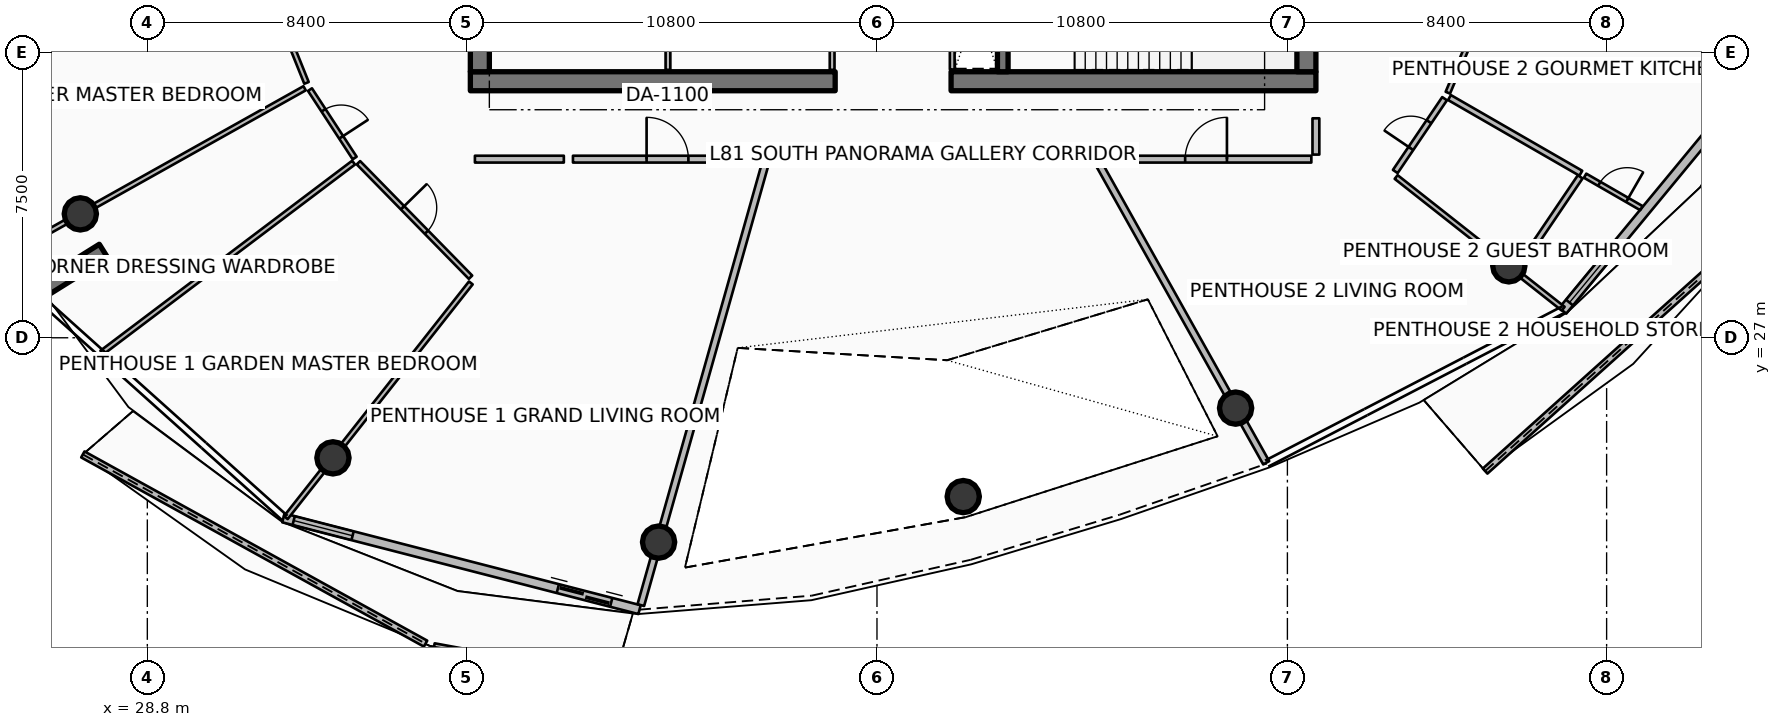
"""IFC4 building model, lengths in metres.
Left out: names, types, materials, properties, quantities, classifications, styles, units other than length and angle.
Written with IfcOpenShell. Run it as: python <this file> out.ifc"""

import sys

from ifc_helpers import new_model, si_unit, direction, frame, frame_2d, origin, origin_2d, place, context, subcontext, project, spatial, polyline, rectangle, circle, outline, extrude, element, fill, save


model = new_model("IFC4")
c1 = context("Model", 3, precision=1e-05, world=origin(), true_north=direction((0.0, 1.0)))
c2 = subcontext(c1, "Body", "Model", "MODEL_VIEW")
j1 = project(units=[si_unit("LENGTHUNIT", "METRE"), si_unit("PLANEANGLEUNIT", "RADIAN")], contexts=[c1])
p1 = place(None, origin())
s1 = spatial("IfcSite", under=j1, at=p1, CompositionType="ELEMENT")
p2 = place(p1, origin())
s2 = spatial("IfcBuilding", under=s1, at=p2, CompositionType="ELEMENT")
p3 = place(p2, frame((0.0, 0.0, 322.1)))
s3 = spatial("IfcBuildingStorey", under=s2, at=p3, CompositionType="ELEMENT", Elevation=322.1)
p4 = place(p3, frame((37.3, 33.75, 0.0), z_axis=(0.0, 0.0, 1.0), x_axis=(1.0, 0.0, 0.0)))
e1 = element("IfcWall", 1, at=p4, inside=s3, PredefinedType="SHEAR", context=c2, shape_type="SweptSolid", body=[
    extrude(rectangle(XDim=9.6, YDim=0.5, at=frame_2d((4.8, 0.0))), origin(), (0.0, 0.0, 1.0), 4.2),
])
p5 = place(p3, frame((49.95, 33.75, 0.0), z_axis=(0.0, 0.0, 1.0), x_axis=(1.0, 0.0, 0.0)))
e2 = element("IfcWall", 2, at=p5, inside=s3, PredefinedType="SHEAR", context=c2, shape_type="SweptSolid", body=[
    extrude(rectangle(XDim=9.6, YDim=0.5, at=frame_2d((4.8, 0.0))), origin(), (0.0, 0.0, 1.0), 4.2),
])
for number, where, z_axis, x_axis in (
    (3, (37.55, 34.0, 0.0), (0.0, 0.0, 1.0), (0.0, 1.0, 0.0)),
    (4, (59.3, 34.0, 0.0), (0.0, 0.0, 1.0), (0.0, 1.0, 0.0)),
):
    element("IfcWall", number, at=place(p3, frame(where, z_axis=z_axis, x_axis=x_axis)), inside=s3, PredefinedType="SHEAR", context=c2, shape_type="SweptSolid", body=[
        extrude(rectangle(XDim=16.0, YDim=0.5, at=frame_2d((8.0, 0.0))), origin(), (0.0, 0.0, 1.0), 4.2),
    ])
p6 = place(p3, frame((51.31, 34.0, 0.0), z_axis=(0.0, 0.0, 1.0), x_axis=(0.0, 1.0, 0.0)))
e5 = element("IfcWall", 5, at=p6, inside=s3, PredefinedType="SHEAR", context=c2, shape_type="SweptSolid", body=[
    extrude(rectangle(XDim=3.5, YDim=0.28, at=frame_2d((1.75, 0.0))), origin(), (0.0, 0.0, 1.0), 4.2),
])
p7 = place(p3, frame((27.647, 29.282, 0.0), z_axis=(0.0, 0.0, 1.0), x_axis=(-0.848053161125, -0.529911158502, 0.0)))
e6 = element("IfcWall", 6, at=p7, inside=s3, PredefinedType="SOLIDWALL", context=c2, shape_type="SweptSolid", body=[
    extrude(rectangle(XDim=3.5, YDim=0.42, at=frame_2d((1.75, 0.0))), origin(), (0.0, 0.0, 1.0), 4.2),
])
for number, where, z_axis, x_axis in (
    (7, (27.037, 30.26, 0.0), (0.0, 0.0, 1.0), (1.0, 0.0, 0.0)),
    (8, (33.684, 23.841, 0.0), (0.0, 0.0, 1.0), (1.0, 0.0, 0.0)),
    (9, (42.253, 21.624, 0.0), (0.0, 0.0, 1.0), (1.0, 0.0, 0.0)),
):
    element("IfcColumn", number, at=place(p3, frame(where, z_axis=z_axis, x_axis=x_axis)), inside=s3, PredefinedType="COLUMN", context=c2, shape_type="SweptSolid", body=[
        extrude(circle(Radius=0.425, at=origin_2d()), origin(), (0.0, 0.0, 1.0), 3.94),
    ])
p8 = place(p3, frame((50.27, 22.821, 0.0), z_axis=(0.0, 0.0, 1.0), x_axis=(1.0, 0.0, 0.0)))
e10 = element("IfcColumn", 10, at=p8, inside=s3, PredefinedType="COLUMN", context=c2, shape_type="SweptSolid", body=[
    extrude(circle(Radius=0.425, at=origin_2d()), origin(), (0.0, 0.0, 1.0), 4.196),
])
for number, where, z_axis, x_axis in (
    (11, (57.437, 25.149, 0.0), (0.0, 0.0, 1.0), (1.0, 0.0, 0.0)),
    (12, (64.626, 28.893, 0.0), (0.0, 0.0, 1.0), (1.0, 0.0, 0.0)),
):
    element("IfcColumn", number, at=place(p3, frame(where, z_axis=z_axis, x_axis=x_axis)), inside=s3, PredefinedType="COLUMN", context=c2, shape_type="SweptSolid", body=[
        extrude(circle(Radius=0.425, at=origin_2d()), origin(), (0.0, 0.0, 1.0), 3.94),
    ])
p9 = place(p3, frame((27.103, 23.93, 0.0), z_axis=(0.0, 0.0, 1.0), x_axis=(0.875469817093, -0.483272800145, 0.0)))
e13 = element("IfcWall", 13, at=p9, inside=s3, PredefinedType="PARAPET", context=c2, shape_type="SweptSolid", body=[
    extrude(outline(polyline([(0.0, 0.0), (10.302, 0.0), (10.302, 1.148), (5.151, 1.127), (0.0, 1.224), (0.0, 0.0)])), frame((0.0, 0.09, 0.0), z_axis=(0.0, -1.0, 0.0), x_axis=(1.0, 0.0, 0.0)), (0.0, 0.0, 1.0), 0.18),
])
p10 = place(p3, frame((36.345, 18.872, 0.0), z_axis=(0.0, 0.0, 1.0), x_axis=(0.983429847583, -0.18128909201, 0.0)))
e14 = element("IfcWall", 14, at=p10, inside=s3, PredefinedType="PARAPET", context=c2, shape_type="SweptSolid", body=[
    extrude(outline(polyline([(0.0, 0.0), (4.808, 0.0), (4.808, 1.279), (0.0, 1.148), (0.0, 0.0)])), frame((0.0, 0.09, 0.0), z_axis=(0.0, -1.0, 0.0), x_axis=(1.0, 0.0, 0.0)), (0.0, 0.0, 1.0), 0.18),
])
p11 = place(p3, frame((64.003, 23.493, 0.0), z_axis=(0.0, 0.0, 1.0), x_axis=(0.74390919155, 0.668280715514, 0.0)))
e15 = element("IfcWall", 15, at=p11, inside=s3, PredefinedType="PARAPET", context=c2, shape_type="SweptSolid", body=[
    extrude(outline(polyline([(0.0, 0.0), (9.765, 0.0), (9.765, 1.348), (4.883, 1.562), (0.0, 1.747), (0.0, 0.0)])), frame((0.0, 0.09, 0.0), z_axis=(0.0, -1.0, 0.0), x_axis=(1.0, 0.0, 0.0)), (0.0, 0.0, 1.0), 0.18),
])
p12 = place(p3, frame((32.38, 22.26, 0.0), z_axis=(0.0, 0.0, 1.0), x_axis=(0.968389062354, -0.249444630957, 0.0)))
e16 = element("IfcWall", 16, at=p12, inside=s3, PredefinedType="SOLIDWALL", context=c2, shape_type="SweptSolid", body=[
    extrude(rectangle(XDim=9.678, YDim=0.24, at=frame_2d((4.839, 0.0))), origin(), (0.0, 0.0, 1.0), 2.89),
])
p13 = place(p12, frame((7.458, 0.0, 0.0)))
e17 = element("IfcOpeningElement", 17, at=p13, cuts=e16, PredefinedType="OPENING", context=c2, shape_type="SweptSolid", body=[
    extrude(rectangle(XDim=1.45, YDim=2.15, at=frame_2d((0.725, 1.075))), frame((0.0, 0.13, 0.0), z_axis=(0.0, -1.0, 0.0), x_axis=(1.0, 0.0, 0.0)), (0.0, 0.0, 1.0), 0.26),
])
p14 = place(p12, frame((0.28, 0.0, 0.65)))
e18 = element("IfcOpeningElement", 18, at=p14, cuts=e16, PredefinedType="OPENING", context=c2, shape_type="SweptSolid", body=[
    extrude(rectangle(XDim=1.6, YDim=1.5, at=frame_2d((0.8, 0.75))), frame((0.0, 0.13, 0.0), z_axis=(0.0, -1.0, 0.0), x_axis=(1.0, 0.0, 0.0)), (0.0, 0.0, 1.0), 0.26),
])
p15 = place(p3, frame((66.045, 27.711, 0.0), z_axis=(0.0, 0.0, 1.0), x_axis=(0.636803612721, 0.771026042897, 0.0)))
e19 = element("IfcWall", 19, at=p15, inside=s3, PredefinedType="SOLIDWALL", context=c2, shape_type="SweptSolid", body=[
    extrude(rectangle(XDim=9.728, YDim=0.24, at=frame_2d((4.864, 0.0))), origin(), (0.0, 0.0, 1.0), 2.89),
])
p16 = place(p15, frame((7.508, 0.0, 0.0)))
e20 = element("IfcOpeningElement", 20, at=p16, cuts=e19, PredefinedType="OPENING", context=c2, shape_type="SweptSolid", body=[
    extrude(rectangle(XDim=1.45, YDim=2.15, at=frame_2d((0.725, 1.075))), frame((0.0, 0.13, 0.0), z_axis=(0.0, -1.0, 0.0), x_axis=(1.0, 0.0, 0.0)), (0.0, 0.0, 1.0), 0.26),
])
p17 = place(p15, frame((0.28, 0.0, 0.65)))
e21 = element("IfcOpeningElement", 21, at=p17, cuts=e19, PredefinedType="OPENING", context=c2, shape_type="SweptSolid", body=[
    extrude(rectangle(XDim=1.6, YDim=1.5, at=frame_2d((0.8, 0.75))), frame((0.0, 0.13, 0.0), z_axis=(0.0, -1.0, 0.0), x_axis=(1.0, 0.0, 0.0)), (0.0, 0.0, 1.0), 0.26),
])
for number, where, z_axis, x_axis in (
    (22, (46.82, 34.05, 0.0), (0.0, 0.0, 1.0), (0.0, 1.0, 0.0)),
    (23, (42.5, 34.05, 0.0), (0.0, 0.0, 1.0), (0.0, 1.0, 0.0)),
):
    element("IfcWall", number, at=place(p3, frame(where, z_axis=z_axis, x_axis=x_axis)), inside=s3, PredefinedType="PARTITIONING", context=c2, shape_type="SweptSolid", body=[
        extrude(rectangle(XDim=2.03, YDim=0.125, at=frame_2d((1.015, 0.0))), origin(), (0.0, 0.0, 1.0), 3.38),
    ])
p18 = place(p3, frame((49.98, 34.06, 0.0), z_axis=(0.0, 0.0, 1.0), x_axis=(0.0, 1.0, 0.0)))
e24 = element("IfcWall", 24, at=p18, inside=s3, PredefinedType="PARTITIONING", context=c2, shape_type="SweptSolid", body=[
    extrude(rectangle(XDim=3.4, YDim=0.125, at=frame_2d((1.7, 0.0))), origin(), (0.0, 0.0, 1.0), 3.38),
])
p19 = place(p3, frame((45.165, 31.7, 0.0), z_axis=(0.0, 0.0, 1.0), x_axis=(1.0, 0.0, 0.0)))
e25 = element("IfcWall", 25, at=p19, inside=s3, PredefinedType="SOLIDWALL", context=c2, shape_type="SweptSolid", body=[
    extrude(rectangle(XDim=8.533, YDim=0.24, at=frame_2d((4.267, 0.0))), origin(), (0.0, 0.0, 1.0), 3.38),
])
p20 = place(p3, frame((45.095, 31.7, 0.0), z_axis=(0.0, 0.0, 1.0), x_axis=(-0.271453030279, -0.962451688321, 0.0)))
e26 = element("IfcWall", 26, at=p20, inside=s3, PredefinedType="PARTITIONING", context=c2, shape_type="SweptSolid", body=[
    extrude(rectangle(XDim=12.191, YDim=0.18, at=frame_2d((6.096, 0.0))), origin(), (0.0, 0.0, 1.0), 3.38),
])
p21 = place(p3, frame((53.768, 31.7, 0.0), z_axis=(0.0, 0.0, 1.0), x_axis=(0.488623665245, -0.872494649704, 0.0)))
e27 = element("IfcWall", 27, at=p21, inside=s3, PredefinedType="PARTITIONING", context=c2, shape_type="SweptSolid", body=[
    extrude(rectangle(XDim=9.157, YDim=0.18, at=frame_2d((4.579, 0.0))), origin(), (0.0, 0.0, 1.0), 3.38),
])
p22 = place(p3, frame((40.0, 31.7, 0.0), z_axis=(0.0, 0.0, 1.0), x_axis=(1.0, 0.0, 0.0)))
e28 = element("IfcWall", 28, at=p22, inside=s3, PredefinedType="PARTITIONING", context=c2, shape_type="SweptSolid", body=[
    extrude(rectangle(XDim=4.975, YDim=0.18, at=frame_2d((2.488, 0.0))), origin(), (0.0, 0.0, 1.0), 3.38),
])
p23 = place(p22, frame((1.938, 0.0, 0.0)))
e29 = element("IfcOpeningElement", 29, at=p23, cuts=e28, PredefinedType="OPENING", context=c2, shape_type="SweptSolid", body=[
    extrude(rectangle(XDim=1.1, YDim=2.1, at=frame_2d((0.55, 1.05))), frame((0.0, 0.1, 0.0), z_axis=(0.0, -1.0, 0.0), x_axis=(1.0, 0.0, 0.0)), (0.0, 0.0, 1.0), 0.2),
])
p24 = place(p3, frame((31.416, 37.618, 0.0), z_axis=(0.0, 0.0, 1.0), x_axis=(0.37287786912, -0.927880431263, 0.0)))
e30 = element("IfcWall", 30, at=p24, inside=s3, PredefinedType="PARTITIONING", context=c2, shape_type="SweptSolid", body=[
    extrude(rectangle(XDim=4.216, YDim=0.125, at=frame_2d((2.108, 0.0))), origin(), (0.0, 0.0, 1.0), 3.38),
])
p25 = place(p24, frame((1.658, 0.0, 0.0)))
e31 = element("IfcOpeningElement", 31, at=p25, cuts=e30, PredefinedType="OPENING", context=c2, shape_type="SweptSolid", body=[
    extrude(rectangle(XDim=0.9, YDim=2.08, at=frame_2d((0.45, 1.04))), frame((0.0, 0.073, 0.0), z_axis=(0.0, -1.0, 0.0), x_axis=(1.0, 0.0, 0.0)), (0.0, 0.0, 1.0), 0.145),
])
p26 = place(p3, frame((37.42, 31.7, 0.0), z_axis=(0.0, 0.0, 1.0), x_axis=(1.0, 0.0, 0.0)))
e32 = element("IfcWall", 32, at=p26, inside=s3, PredefinedType="PARTITIONING", context=c2, shape_type="SweptSolid", body=[
    extrude(rectangle(XDim=2.34, YDim=0.18, at=frame_2d((1.17, 0.0))), origin(), (0.0, 0.0, 1.0), 3.38),
])
p27 = place(p3, frame((32.938, 33.565, 0.0), z_axis=(0.0, 0.0, 1.0), x_axis=(-0.87250261652, -0.488609439293, 0.0)))
e33 = element("IfcWall", 33, at=p27, inside=s3, PredefinedType="PARTITIONING", context=c2, shape_type="SweptSolid", body=[
    extrude(rectangle(XDim=8.573, YDim=0.125, at=frame_2d((4.286, 0.0))), origin(), (0.0, 0.0, 1.0), 3.38),
])
p28 = place(p3, frame((37.312, 28.443, 0.0), z_axis=(0.0, 0.0, 1.0), x_axis=(-0.619079427556, -0.78532837869, 0.0)))
e34 = element("IfcWall", 34, at=p28, inside=s3, PredefinedType="PARTITIONING", context=c2, shape_type="SweptSolid", body=[
    extrude(rectangle(XDim=7.864, YDim=0.125, at=frame_2d((3.932, 0.0))), origin(), (0.0, 0.0, 1.0), 3.38),
])
p29 = place(p3, frame((34.228, 31.608, 0.0), z_axis=(0.0, 0.0, 1.0), x_axis=(-0.798277484709, -0.602289845014, 0.0)))
e35 = element("IfcWall", 35, at=p29, inside=s3, PredefinedType="PARTITIONING", context=c2, shape_type="SweptSolid", body=[
    extrude(rectangle(XDim=8.299, YDim=0.125, at=frame_2d((4.149, 0.0))), origin(), (0.0, 0.0, 1.0), 3.38),
])
p30 = place(p3, frame((33.08, 33.53, 0.0), z_axis=(0.0, 0.0, 1.0), x_axis=(0.546735291737, -0.837305512205, 0.0)))
e36 = element("IfcWall", 36, at=p30, inside=s3, PredefinedType="PARTITIONING", context=c2, shape_type="SweptSolid", body=[
    extrude(rectangle(XDim=2.15, YDim=0.125, at=frame_2d((1.075, 0.0))), origin(), (0.0, 0.0, 1.0), 3.38),
])
p31 = place(p30, frame((0.65, 0.0, 0.0)))
e37 = element("IfcOpeningElement", 37, at=p31, cuts=e36, PredefinedType="OPENING", context=c2, shape_type="SweptSolid", body=[
    extrude(rectangle(XDim=0.85, YDim=2.06, at=frame_2d((0.425, 1.03))), frame((0.0, 0.073, 0.0), z_axis=(0.0, -1.0, 0.0), x_axis=(1.0, 0.0, 0.0)), (0.0, 0.0, 1.0), 0.145),
])
p32 = place(p3, frame((34.355, 31.605, 0.0), z_axis=(0.0, 0.0, 1.0), x_axis=(0.699567507915, -0.714566513258, 0.0)))
e38 = element("IfcWall", 38, at=p32, inside=s3, PredefinedType="PARTITIONING", context=c2, shape_type="SweptSolid", body=[
    extrude(rectangle(XDim=4.216, YDim=0.125, at=frame_2d((2.108, 0.0))), origin(), (0.0, 0.0, 1.0), 3.38),
])
p33 = place(p32, frame((1.658, 0.0, 0.0)))
e39 = element("IfcOpeningElement", 39, at=p33, cuts=e38, PredefinedType="OPENING", context=c2, shape_type="SweptSolid", body=[
    extrude(rectangle(XDim=0.9, YDim=2.08, at=frame_2d((0.45, 1.04))), frame((0.0, 0.073, 0.0), z_axis=(0.0, -1.0, 0.0), x_axis=(1.0, 0.0, 0.0)), (0.0, 0.0, 1.0), 0.145),
])
p34 = place(p3, frame((53.888, 31.7, 0.0), z_axis=(0.0, 0.0, 1.0), x_axis=(1.0, 0.0, 0.0)))
e40 = element("IfcWall", 40, at=p34, inside=s3, PredefinedType="PARTITIONING", context=c2, shape_type="SweptSolid", body=[
    extrude(rectangle(XDim=5.542, YDim=0.18, at=frame_2d((2.771, 0.0))), origin(), (0.0, 0.0, 1.0), 3.38),
])
p35 = place(p34, frame((2.221, 0.0, 0.0)))
e41 = element("IfcOpeningElement", 41, at=p35, cuts=e40, PredefinedType="OPENING", context=c2, shape_type="SweptSolid", body=[
    extrude(rectangle(XDim=1.1, YDim=2.1, at=frame_2d((0.55, 1.05))), frame((0.0, 0.1, 0.0), z_axis=(0.0, -1.0, 0.0), x_axis=(1.0, 0.0, 0.0)), (0.0, 0.0, 1.0), 0.2),
])
p36 = place(p3, frame((59.55, 31.82, 0.0), z_axis=(0.0, 0.0, 1.0), x_axis=(0.0, 1.0, 0.0)))
e42 = element("IfcWall", 42, at=p36, inside=s3, PredefinedType="PARTITIONING", context=c2, shape_type="SweptSolid", body=[
    extrude(rectangle(XDim=0.955, YDim=0.18, at=frame_2d((0.477, 0.0))), origin(), (0.0, 0.0, 1.0), 3.38),
])
p37 = place(p3, frame((61.661, 31.23, 0.0), z_axis=(0.0, 0.0, 1.0), x_axis=(0.785321366699, -0.61908832246, 0.0)))
e43 = element("IfcWall", 43, at=p37, inside=s3, PredefinedType="PARTITIONING", context=c2, shape_type="SweptSolid", body=[
    extrude(rectangle(XDim=5.597, YDim=0.125, at=frame_2d((2.799, 0.0))), origin(), (0.0, 0.0, 1.0), 3.38),
])
p38 = place(p3, frame((61.639, 31.375, 0.0), z_axis=(0.0, 0.0, 1.0), x_axis=(0.56062651507, 0.828068783738, 0.0)))
e44 = element("IfcWall", 44, at=p38, inside=s3, PredefinedType="PARTITIONING", context=c2, shape_type="SweptSolid", body=[
    extrude(rectangle(XDim=2.314, YDim=0.15, at=frame_2d((1.157, 0.0))), origin(), (0.0, 0.0, 1.0), 3.38),
])
p39 = place(p38, frame((0.732, 0.0, 0.0)))
e45 = element("IfcOpeningElement", 45, at=p39, cuts=e44, PredefinedType="OPENING", context=c2, shape_type="SweptSolid", body=[
    extrude(rectangle(XDim=0.85, YDim=2.06, at=frame_2d((0.425, 1.03))), frame((0.0, 0.085, 0.0), z_axis=(0.0, -1.0, 0.0), x_axis=(1.0, 0.0, 0.0)), (0.0, 0.0, 1.0), 0.17),
])
p40 = place(p3, frame((64.874, 28.825, 0.0), z_axis=(0.0, 0.0, 1.0), x_axis=(0.560532780406, 0.82813223708, 0.0)))
e46 = element("IfcWall", 46, at=p40, inside=s3, PredefinedType="PARTITIONING", context=c2, shape_type="SweptSolid", body=[
    extrude(rectangle(XDim=2.91, YDim=0.15, at=frame_2d((1.455, 0.0))), origin(), (0.0, 0.0, 1.0), 3.38),
])
p41 = place(p3, frame((63.065, 33.321, 0.0), z_axis=(0.0, 0.0, 1.0), x_axis=(0.866490095299, -0.499194265541, 0.0)))
e47 = element("IfcWall", 47, at=p41, inside=s3, PredefinedType="PARTITIONING", context=c2, shape_type="SweptSolid", body=[
    extrude(rectangle(XDim=3.989, YDim=0.15, at=frame_2d((1.994, 0.0))), origin(), (0.0, 0.0, 1.0), 3.38),
])
p42 = place(p3, frame((66.634, 31.265, 0.0), z_axis=(0.0, 0.0, 1.0), x_axis=(0.866444624685, -0.499273184094, 0.0)))
e48 = element("IfcWall", 48, at=p42, inside=s3, PredefinedType="PARTITIONING", context=c2, shape_type="SweptSolid", body=[
    extrude(rectangle(XDim=1.709, YDim=0.125, at=frame_2d((0.855, 0.0))), origin(), (0.0, 0.0, 1.0), 3.38),
])
p43 = place(p42, frame((0.43, 0.0, 0.0)))
e49 = element("IfcOpeningElement", 49, at=p43, cuts=e48, PredefinedType="OPENING", context=c2, shape_type="SweptSolid", body=[
    extrude(rectangle(XDim=0.85, YDim=2.06, at=frame_2d((0.425, 1.03))), frame((0.0, 0.073, 0.0), z_axis=(0.0, -1.0, 0.0), x_axis=(1.0, 0.0, 0.0)), (0.0, 0.0, 1.0), 0.145),
])
p44 = place(p3, frame((63.021, 33.448, 0.0), z_axis=(0.0, 0.0, 1.0), x_axis=(0.388350881923, 0.921511580236, 0.0)))
e50 = element("IfcWall", 50, at=p44, inside=s3, PredefinedType="PARTITIONING", context=c2, shape_type="SweptSolid", body=[
    extrude(rectangle(XDim=4.085, YDim=0.125, at=frame_2d((2.042, 0.0))), origin(), (0.0, 0.0, 1.0), 3.38),
])
p45 = place(p44, frame((1.593, 0.0, 0.0)))
e51 = element("IfcOpeningElement", 51, at=p45, cuts=e50, PredefinedType="OPENING", context=c2, shape_type="SweptSolid", body=[
    extrude(rectangle(XDim=0.9, YDim=2.08, at=frame_2d((0.45, 1.04))), frame((0.0, 0.073, 0.0), z_axis=(0.0, -1.0, 0.0), x_axis=(1.0, 0.0, 0.0)), (0.0, 0.0, 1.0), 0.145),
])
p46 = place(p13, origin())
e52 = element("IfcDoor", 52, at=p46, inside=s3, OperationType="DOUBLE_DOOR_SLIDING", PredefinedType="DOOR", context=c2, shape_type="SweptSolid", body=[
    extrude(rectangle(XDim=1.45, YDim=2.15, at=frame_2d((0.725, 1.075))), frame((0.0, 0.025, 0.0), z_axis=(0.0, -1.0, 0.0), x_axis=(1.0, 0.0, 0.0)), (0.0, 0.0, 1.0), 0.05),
])
fill(e17, e52)
p47 = place(p14, origin())
e53 = element("IfcWindow", 53, at=p47, inside=s3, PartitioningType="SINGLE_PANEL", PredefinedType="WINDOW", context=c2, shape_type="SweptSolid", body=[
    extrude(rectangle(XDim=1.6, YDim=1.5, at=frame_2d((0.8, 0.75))), frame((0.0, 0.03, 0.0), z_axis=(0.0, -1.0, 0.0), x_axis=(1.0, 0.0, 0.0)), (0.0, 0.0, 1.0), 0.06),
])
fill(e18, e53)
p48 = place(p17, origin())
e54 = element("IfcWindow", 54, at=p48, inside=s3, PartitioningType="SINGLE_PANEL", PredefinedType="WINDOW", context=c2, shape_type="SweptSolid", body=[
    extrude(rectangle(XDim=1.6, YDim=1.5, at=frame_2d((0.8, 0.75))), frame((0.0, 0.03, 0.0), z_axis=(0.0, -1.0, 0.0), x_axis=(1.0, 0.0, 0.0)), (0.0, 0.0, 1.0), 0.06),
])
fill(e21, e54)
p49 = place(p23, origin())
e55 = element("IfcDoor", 55, at=p49, inside=s3, OperationType="SINGLE_SWING_LEFT", PredefinedType="DOOR", context=c2, shape_type="SweptSolid", body=[
    extrude(rectangle(XDim=1.1, YDim=2.1, at=frame_2d((0.55, 1.05))), frame((0.0, 0.025, 0.0), z_axis=(0.0, -1.0, 0.0), x_axis=(1.0, 0.0, 0.0)), (0.0, 0.0, 1.0), 0.05),
])
fill(e29, e55)
p50 = place(p31, origin())
e56 = element("IfcDoor", 56, at=p50, inside=s3, OperationType="SINGLE_SWING_RIGHT", PredefinedType="DOOR", context=c2, shape_type="SweptSolid", body=[
    extrude(rectangle(XDim=0.85, YDim=2.06, at=frame_2d((0.425, 1.03))), frame((0.0, 0.025, 0.0), z_axis=(0.0, -1.0, 0.0), x_axis=(1.0, 0.0, 0.0)), (0.0, 0.0, 1.0), 0.05),
])
fill(e37, e56)
p51 = place(p33, origin())
e57 = element("IfcDoor", 57, at=p51, inside=s3, OperationType="SINGLE_SWING_LEFT", PredefinedType="DOOR", context=c2, shape_type="SweptSolid", body=[
    extrude(rectangle(XDim=0.9, YDim=2.08, at=frame_2d((0.45, 1.04))), frame((0.0, 0.025, 0.0), z_axis=(0.0, -1.0, 0.0), x_axis=(1.0, 0.0, 0.0)), (0.0, 0.0, 1.0), 0.05),
])
fill(e39, e57)
p52 = place(p35, origin())
e58 = element("IfcDoor", 58, at=p52, inside=s3, OperationType="SINGLE_SWING_RIGHT", PredefinedType="DOOR", context=c2, shape_type="SweptSolid", body=[
    extrude(rectangle(XDim=1.1, YDim=2.1, at=frame_2d((0.55, 1.05))), frame((0.0, 0.025, 0.0), z_axis=(0.0, -1.0, 0.0), x_axis=(1.0, 0.0, 0.0)), (0.0, 0.0, 1.0), 0.05),
])
fill(e41, e58)
p53 = place(p39, origin())
e59 = element("IfcDoor", 59, at=p53, inside=s3, OperationType="SINGLE_SWING_LEFT", PredefinedType="DOOR", context=c2, shape_type="SweptSolid", body=[
    extrude(rectangle(XDim=0.85, YDim=2.06, at=frame_2d((0.425, 1.03))), frame((0.0, 0.025, 0.0), z_axis=(0.0, -1.0, 0.0), x_axis=(1.0, 0.0, 0.0)), (0.0, 0.0, 1.0), 0.05),
])
fill(e45, e59)
p54 = place(p43, origin())
e60 = element("IfcDoor", 60, at=p54, inside=s3, OperationType="SINGLE_SWING_RIGHT", PredefinedType="DOOR", context=c2, shape_type="SweptSolid", body=[
    extrude(rectangle(XDim=0.85, YDim=2.06, at=frame_2d((0.425, 1.03))), frame((0.0, 0.025, 0.0), z_axis=(0.0, -1.0, 0.0), x_axis=(1.0, 0.0, 0.0)), (0.0, 0.0, 1.0), 0.05),
])
fill(e49, e60)
save(model, sys.argv[1])
